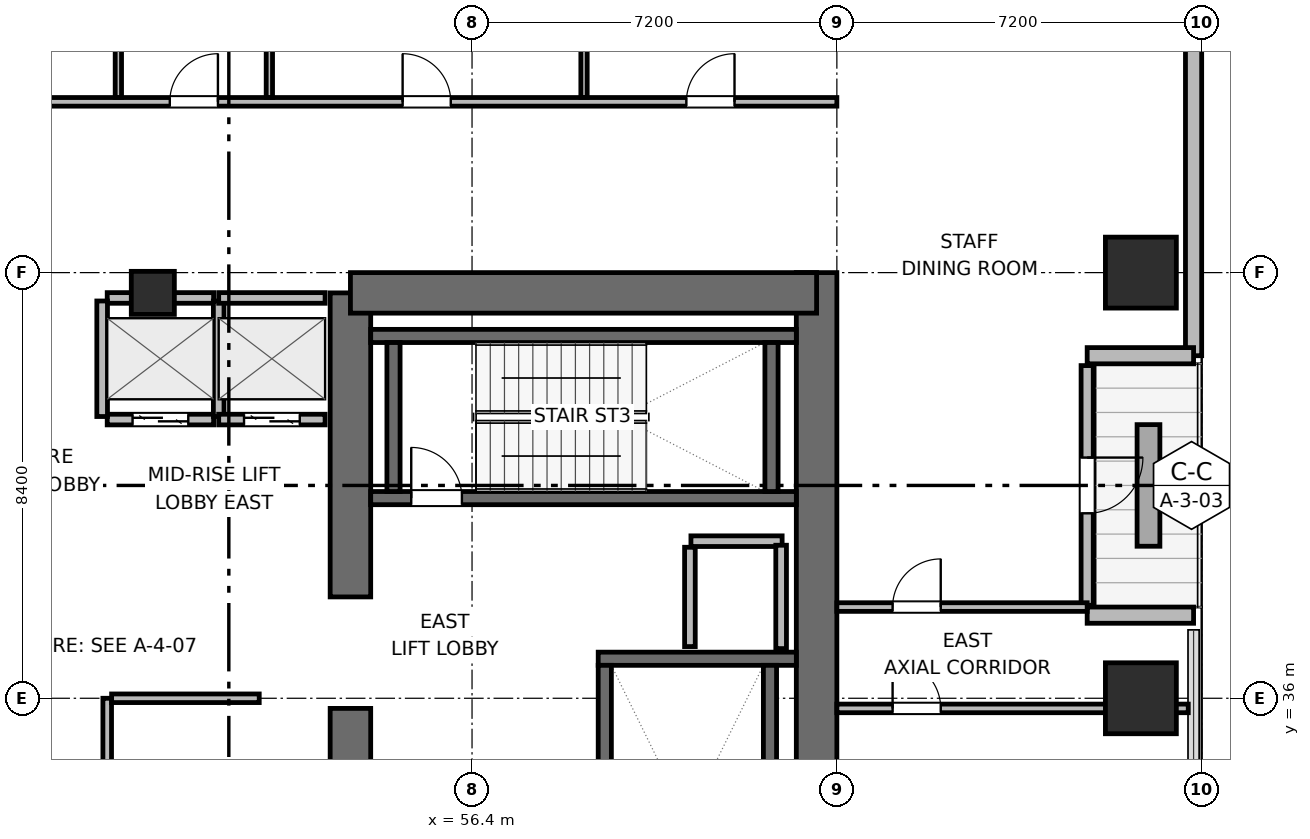
"""IFC4 building model, lengths in metres.
Left out: names, types, materials, properties, quantities, classifications, styles, units other than length and angle.
Written with IfcOpenShell. Run it as: python <this file> out.ifc"""

import sys

from ifc_helpers import new_model, si_unit, direction, frame, frame_2d, origin, origin_2d, place, context, subcontext, project, spatial, rectangle, extrude, element, fill, save


model = new_model("IFC4")
c1 = context("Model", 3, precision=1e-05, world=origin(), true_north=direction((0.0, 1.0)))
c2 = subcontext(c1, "Body", "Model", "MODEL_VIEW")
j1 = project(units=[si_unit("LENGTHUNIT", "METRE"), si_unit("PLANEANGLEUNIT", "RADIAN")], contexts=[c1])
p1 = place(None, origin())
s1 = spatial("IfcSite", under=j1, at=p1, CompositionType="ELEMENT")
p2 = place(p1, origin())
s2 = spatial("IfcBuilding", under=s1, at=p2, CompositionType="ELEMENT")
p3 = place(p2, frame((0.0, 0.0, 120.9)))
s3 = spatial("IfcBuildingStorey", under=s2, at=p3, CompositionType="ELEMENT", Elevation=120.9)
p4 = place(p3, frame((54.0, 28.0, 0.0), z_axis=(0.0, 0.0, 1.0), x_axis=(0.0, 1.0, 0.0)))
e1 = element("IfcWall", 1, at=p4, inside=s3, PredefinedType="SHEAR", context=c2, shape_type="SweptSolid", body=[
    extrude(rectangle(XDim=7.8, YDim=0.8, at=frame_2d((3.9, 0.0))), origin(), (0.0, 0.0, 1.0), 4.5),
])
p5 = place(p3, frame((54.0, 38.0, 0.0), z_axis=(0.0, 0.0, 1.0), x_axis=(0.0, 1.0, 0.0)))
e2 = element("IfcWall", 2, at=p5, inside=s3, PredefinedType="SHEAR", context=c2, shape_type="SweptSolid", body=[
    extrude(rectangle(XDim=6.0, YDim=0.8, at=frame_2d((3.0, 0.0))), origin(), (0.0, 0.0, 1.0), 4.5),
])
p6 = place(p3, frame((63.2, 27.6, 0.0), z_axis=(0.0, 0.0, 1.0), x_axis=(0.0, 1.0, 0.0)))
e3 = element("IfcWall", 3, at=p6, inside=s3, PredefinedType="SHEAR", context=c2, shape_type="SweptSolid", body=[
    extrude(rectangle(XDim=16.8, YDim=0.8, at=frame_2d((8.4, 0.0))), origin(), (0.0, 0.0, 1.0), 4.5),
])
p7 = place(p3, frame((54.0, 44.0, 0.0), z_axis=(0.0, 0.0, 1.0), x_axis=(1.0, 0.0, 0.0)))
e4 = element("IfcWall", 4, at=p7, inside=s3, PredefinedType="SHEAR", context=c2, shape_type="SweptSolid", body=[
    extrude(rectangle(XDim=9.2, YDim=0.8, at=frame_2d((4.6, 0.0))), origin(), (0.0, 0.0, 1.0), 4.5),
])
p8 = place(p3, frame((58.89, 36.78, 0.0), z_axis=(0.0, 0.0, 1.0), x_axis=(1.0, 0.0, 0.0)))
e5 = element("IfcWall", 5, at=p8, inside=s3, PredefinedType="SHEAR", context=c2, shape_type="SweptSolid", body=[
    extrude(rectangle(XDim=3.91, YDim=0.26, at=frame_2d((1.955, 0.0))), origin(), (0.0, 0.0, 1.0), 4.5),
])
p9 = place(p3, frame((59.02, 29.05, 0.0), z_axis=(0.0, 0.0, 1.0), x_axis=(0.0, 1.0, 0.0)))
e6 = element("IfcWall", 6, at=p9, inside=s3, PredefinedType="SHEAR", context=c2, shape_type="SweptSolid", body=[
    extrude(rectangle(XDim=7.6, YDim=0.26, at=frame_2d((3.8, 0.0))), origin(), (0.0, 0.0, 1.0), 4.5),
])
p10 = place(p9, frame((0.3, 0.0, 0.0)))
e7 = element("IfcOpeningElement", 7, at=p10, cuts=e6, PredefinedType="OPENING", context=c2, shape_type="SweptSolid", body=[
    extrude(rectangle(XDim=1.0, YDim=2.04, at=frame_2d((0.5, 1.02))), frame((0.0, 0.14, 0.0), z_axis=(0.0, -1.0, 0.0), x_axis=(1.0, 0.0, 0.0)), (0.0, 0.0, 1.0), 0.28),
])
p11 = place(p3, frame((62.28, 29.05, 0.0), z_axis=(0.0, 0.0, 1.0), x_axis=(0.0, 1.0, 0.0)))
e8 = element("IfcWall", 8, at=p11, inside=s3, PredefinedType="SHEAR", context=c2, shape_type="SweptSolid", body=[
    extrude(rectangle(XDim=7.6, YDim=0.26, at=frame_2d((3.8, 0.0))), origin(), (0.0, 0.0, 1.0), 4.5),
])
p12 = place(p3, frame((54.4, 39.95, 0.0), z_axis=(0.0, 0.0, 1.0), x_axis=(1.0, 0.0, 0.0)))
e9 = element("IfcWall", 9, at=p12, inside=s3, PredefinedType="SHEAR", context=c2, shape_type="SweptSolid", body=[
    extrude(rectangle(XDim=8.4, YDim=0.26, at=frame_2d((4.2, 0.0))), origin(), (0.0, 0.0, 1.0), 4.5),
])
p13 = place(p12, frame((0.8, 0.0, 0.0)))
e10 = element("IfcOpeningElement", 10, at=p13, cuts=e9, PredefinedType="OPENING", context=c2, shape_type="SweptSolid", body=[
    extrude(rectangle(XDim=1.0, YDim=2.04, at=frame_2d((0.5, 1.02))), frame((0.0, 0.14, 0.0), z_axis=(0.0, -1.0, 0.0), x_axis=(1.0, 0.0, 0.0)), (0.0, 0.0, 1.0), 0.28),
])
p14 = place(p3, frame((54.4, 43.15, 0.0), z_axis=(0.0, 0.0, 1.0), x_axis=(1.0, 0.0, 0.0)))
e11 = element("IfcWall", 11, at=p14, inside=s3, PredefinedType="SHEAR", context=c2, shape_type="SweptSolid", body=[
    extrude(rectangle(XDim=8.4, YDim=0.26, at=frame_2d((4.2, 0.0))), origin(), (0.0, 0.0, 1.0), 4.5),
])
for number, where, z_axis, x_axis in (
    (12, (54.85, 40.08, 0.0), (0.0, 0.0, 1.0), (0.0, 1.0, 0.0)),
    (13, (62.31, 40.08, 0.0), (0.0, 0.0, 1.0), (0.0, 1.0, 0.0)),
):
    element("IfcWall", number, at=place(p3, frame(where, z_axis=z_axis, x_axis=x_axis)), inside=s3, PredefinedType="SHEAR", context=c2, shape_type="SweptSolid", body=[
        extrude(rectangle(XDim=2.94, YDim=0.26, at=frame_2d((1.47, 0.0))), origin(), (0.0, 0.0, 1.0), 4.5),
    ])
for number, where, z_axis, x_axis in (
    (14, (69.6, 36.0, 0.0), (0.0, 0.0, 1.0), (1.0, 0.0, 0.0)),
    (15, (69.6, 44.4, 0.0), (0.0, 0.0, 1.0), (1.0, 0.0, 0.0)),
):
    element("IfcColumn", number, at=place(p3, frame(where, z_axis=z_axis, x_axis=x_axis)), inside=s3, PredefinedType="COLUMN", context=c2, shape_type="SweptSolid", body=[
        extrude(rectangle(XDim=1.4, YDim=1.4, at=origin_2d()), origin(), (0.0, 0.0, 1.0), 4.5),
    ])
p15 = place(p3, frame((50.1, 44.0, 0.0), z_axis=(0.0, 0.0, 1.0), x_axis=(1.0, 0.0, 0.0)))
e16 = element("IfcColumn", 16, at=p15, inside=s3, PredefinedType="COLUMN", context=c2, shape_type="SweptSolid", body=[
    extrude(rectangle(XDim=0.85, YDim=0.85, at=origin_2d()), origin(), (0.0, 0.0, 1.0), 4.5),
])
p16 = place(p3, frame((70.64, 56.979, 0.0), z_axis=(0.0, 0.0, 1.0), x_axis=(0.0, -1.0, 0.0)))
e17 = element("IfcWall", 17, at=p16, inside=s3, PredefinedType="SOLIDWALL", context=c2, shape_type="SweptSolid", body=[
    extrude(rectangle(XDim=14.219, YDim=0.32, at=frame_2d((7.109, 0.0))), origin(), (0.0, 0.0, 1.0), 4.24),
])
p17 = place(p3, frame((70.64, 42.76, 0.0), z_axis=(0.0, 0.0, 1.0), x_axis=(-1.0, 0.0, 0.0)))
e18 = element("IfcWall", 18, at=p17, inside=s3, PredefinedType="SOLIDWALL", context=c2, shape_type="SweptSolid", body=[
    extrude(rectangle(XDim=2.1, YDim=0.32, at=frame_2d((1.05, 0.0))), origin(), (0.0, 0.0, 1.0), 3.475),
])
p18 = place(p3, frame((68.54, 42.565, 0.0), z_axis=(0.0, 0.0, 1.0), x_axis=(0.0, -1.0, 0.0)))
e19 = element("IfcWall", 19, at=p18, inside=s3, PredefinedType="SOLIDWALL", context=c2, shape_type="SweptSolid", body=[
    extrude(rectangle(XDim=4.73, YDim=0.24, at=frame_2d((2.365, 0.0))), origin(), (0.0, 0.0, 1.0), 3.762),
])
p19 = place(p18, frame((1.815, 0.0, 0.0)))
e20 = element("IfcOpeningElement", 20, at=p19, cuts=e19, PredefinedType="OPENING", context=c2, shape_type="SweptSolid", body=[
    extrude(rectangle(XDim=1.1, YDim=2.04, at=frame_2d((0.55, 1.02))), frame((0.0, 0.13, 0.0), z_axis=(0.0, -1.0, 0.0), x_axis=(1.0, 0.0, 0.0)), (0.0, 0.0, 1.0), 0.26),
])
p20 = place(p3, frame((68.54, 37.64, 0.0), z_axis=(0.0, 0.0, 1.0), x_axis=(1.0, 0.0, 0.0)))
e21 = element("IfcWall", 21, at=p20, inside=s3, PredefinedType="SOLIDWALL", context=c2, shape_type="SweptSolid", body=[
    extrude(rectangle(XDim=2.1, YDim=0.32, at=frame_2d((1.05, 0.0))), origin(), (0.0, 0.0, 1.0), 3.475),
])
p21 = place(p3, frame((60.72, 39.1, 0.0), z_axis=(0.0, 0.0, 1.0), x_axis=(1.0, 0.0, 0.0)))
e22 = element("IfcWall", 22, at=p21, inside=s3, PredefinedType="PARTITIONING", context=c2, shape_type="SweptSolid", body=[
    extrude(rectangle(XDim=1.8, YDim=0.21, at=frame_2d((0.9, 0.0))), origin(), (0.0, 0.0, 1.0), 4.24),
])
p22 = place(p3, frame((60.7, 37.02, 0.0), z_axis=(0.0, 0.0, 1.0), x_axis=(0.0, 1.0, 0.0)))
e23 = element("IfcWall", 23, at=p22, inside=s3, PredefinedType="PARTITIONING", context=c2, shape_type="SweptSolid", body=[
    extrude(rectangle(XDim=1.96, YDim=0.21, at=frame_2d((0.98, 0.0))), origin(), (0.0, 0.0, 1.0), 4.24),
])
p23 = place(p3, frame((62.5, 36.98, 0.0), z_axis=(0.0, 0.0, 1.0), x_axis=(0.0, 1.0, 0.0)))
e24 = element("IfcWall", 24, at=p23, inside=s3, PredefinedType="PARTITIONING", context=c2, shape_type="SweptSolid", body=[
    extrude(rectangle(XDim=2.04, YDim=0.21, at=frame_2d((1.02, 0.0))), origin(), (0.0, 0.0, 1.0), 4.24),
])
p24 = place(p3, frame((49.2, 41.5, 0.0), z_axis=(0.0, 0.0, 1.0), x_axis=(1.0, 0.0, 0.0)))
e25 = element("IfcWall", 25, at=p24, inside=s3, PredefinedType="PARTITIONING", context=c2, shape_type="SweptSolid", body=[
    extrude(rectangle(XDim=2.1, YDim=0.21, at=frame_2d((1.05, 0.0))), origin(), (0.0, 0.0, 1.0), 4.24),
])
p25 = place(p24, frame((0.5, 0.0, 0.0)))
e26 = element("IfcOpeningElement", 26, at=p25, cuts=e25, PredefinedType="OPENING", context=c2, shape_type="SweptSolid", body=[
    extrude(rectangle(XDim=1.1, YDim=2.04, at=frame_2d((0.55, 1.02))), frame((0.0, 0.115, 0.0), z_axis=(0.0, -1.0, 0.0), x_axis=(1.0, 0.0, 0.0)), (0.0, 0.0, 1.0), 0.23),
])
p26 = place(p3, frame((49.2, 43.9, 0.0), z_axis=(0.0, 0.0, 1.0), x_axis=(1.0, 0.0, 0.0)))
e27 = element("IfcWall", 27, at=p26, inside=s3, PredefinedType="PARTITIONING", context=c2, shape_type="SweptSolid", body=[
    extrude(rectangle(XDim=2.1, YDim=0.21, at=frame_2d((1.05, 0.0))), origin(), (0.0, 0.0, 1.0), 3.125),
])
for number, where, z_axis, x_axis in (
    (28, (49.1, 41.56, 0.0), (0.0, 0.0, 1.0), (0.0, 1.0, 0.0)),
    (29, (51.4, 41.56, 0.0), (0.0, 0.0, 1.0), (0.0, 1.0, 0.0)),
):
    element("IfcWall", number, at=place(p3, frame(where, z_axis=z_axis, x_axis=x_axis)), inside=s3, PredefinedType="PARTITIONING", context=c2, shape_type="SweptSolid", body=[
        extrude(rectangle(XDim=2.28, YDim=0.21, at=frame_2d((1.14, 0.0))), origin(), (0.0, 0.0, 1.0), 4.24),
    ])
p27 = place(p3, frame((51.4, 41.5, 0.0), z_axis=(0.0, 0.0, 1.0), x_axis=(1.0, 0.0, 0.0)))
e30 = element("IfcWall", 30, at=p27, inside=s3, PredefinedType="PARTITIONING", context=c2, shape_type="SweptSolid", body=[
    extrude(rectangle(XDim=2.1, YDim=0.21, at=frame_2d((1.05, 0.0))), origin(), (0.0, 0.0, 1.0), 4.24),
])
p28 = place(p27, frame((0.5, 0.0, 0.0)))
e31 = element("IfcOpeningElement", 31, at=p28, cuts=e30, PredefinedType="OPENING", context=c2, shape_type="SweptSolid", body=[
    extrude(rectangle(XDim=1.1, YDim=2.04, at=frame_2d((0.55, 1.02))), frame((0.0, 0.115, 0.0), z_axis=(0.0, -1.0, 0.0), x_axis=(1.0, 0.0, 0.0)), (0.0, 0.0, 1.0), 0.23),
])
p29 = place(p3, frame((51.4, 43.9, 0.0), z_axis=(0.0, 0.0, 1.0), x_axis=(1.0, 0.0, 0.0)))
e32 = element("IfcWall", 32, at=p29, inside=s3, PredefinedType="PARTITIONING", context=c2, shape_type="SweptSolid", body=[
    extrude(rectangle(XDim=2.1, YDim=0.21, at=frame_2d((1.05, 0.0))), origin(), (0.0, 0.0, 1.0), 3.125),
])
p30 = place(p3, frame((49.2, 32.6, 0.0), z_axis=(0.0, 0.0, 1.0), x_axis=(0.0, 1.0, 0.0)))
e33 = element("IfcWall", 33, at=p30, inside=s3, PredefinedType="PARTITIONING", context=c2, shape_type="SweptSolid", body=[
    extrude(rectangle(XDim=3.4, YDim=0.17, at=frame_2d((1.7, 0.0))), origin(), (0.0, 0.0, 1.0), 4.24),
])
p31 = place(p30, frame((1.25, 0.0, 0.0)))
e34 = element("IfcOpeningElement", 34, at=p31, cuts=e33, PredefinedType="OPENING", context=c2, shape_type="SweptSolid", body=[
    extrude(rectangle(XDim=0.9, YDim=2.02, at=frame_2d((0.45, 1.01))), frame((0.0, 0.095, 0.0), z_axis=(0.0, -1.0, 0.0), x_axis=(1.0, 0.0, 0.0)), (0.0, 0.0, 1.0), 0.19),
])
p32 = place(p3, frame((49.287, 36.0, 0.0), z_axis=(0.0, 0.0, 1.0), x_axis=(1.0, 0.0, 0.0)))
e35 = element("IfcWall", 35, at=p32, inside=s3, PredefinedType="PARTITIONING", context=c2, shape_type="SweptSolid", body=[
    extrude(rectangle(XDim=2.913, YDim=0.17, at=frame_2d((1.457, 0.0))), origin(), (0.0, 0.0, 1.0), 4.24),
])
p33 = place(p3, frame((29.25, 47.77, 0.0), z_axis=(0.0, 0.0, 1.0), x_axis=(1.0, 0.0, 0.0)))
e36 = element("IfcWall", 36, at=p33, inside=s3, PredefinedType="PARTITIONING", context=c2, shape_type="SweptSolid", body=[
    extrude(rectangle(XDim=34.35, YDim=0.17, at=frame_2d((17.175, 0.0))), origin(), (0.0, 0.0, 1.0), 4.24),
])
p34 = place(p33, frame((1.225, 0.0, 0.0)))
e37 = element("IfcOpeningElement", 37, at=p34, cuts=e36, PredefinedType="OPENING", context=c2, shape_type="SweptSolid", body=[
    extrude(rectangle(XDim=0.95, YDim=2.04, at=frame_2d((0.475, 1.02))), frame((0.0, 0.095, 0.0), z_axis=(0.0, -1.0, 0.0), x_axis=(1.0, 0.0, 0.0)), (0.0, 0.0, 1.0), 0.19),
])
p35 = place(p33, frame((6.415, 0.0, 0.0)))
e38 = element("IfcOpeningElement", 38, at=p35, cuts=e36, PredefinedType="OPENING", context=c2, shape_type="SweptSolid", body=[
    extrude(rectangle(XDim=0.95, YDim=2.04, at=frame_2d((0.475, 1.02))), frame((0.0, 0.095, 0.0), z_axis=(0.0, -1.0, 0.0), x_axis=(1.0, 0.0, 0.0)), (0.0, 0.0, 1.0), 0.19),
])
p36 = place(p33, frame((12.105, 0.0, 0.0)))
e39 = element("IfcOpeningElement", 39, at=p36, cuts=e36, PredefinedType="OPENING", context=c2, shape_type="SweptSolid", body=[
    extrude(rectangle(XDim=0.95, YDim=2.04, at=frame_2d((0.475, 1.02))), frame((0.0, 0.095, 0.0), z_axis=(0.0, -1.0, 0.0), x_axis=(1.0, 0.0, 0.0)), (0.0, 0.0, 1.0), 0.19),
])
p37 = place(p33, frame((17.0, 0.0, 0.0)))
e40 = element("IfcOpeningElement", 40, at=p37, cuts=e36, PredefinedType="OPENING", context=c2, shape_type="SweptSolid", body=[
    extrude(rectangle(XDim=0.95, YDim=2.04, at=frame_2d((0.475, 1.02))), frame((0.0, 0.095, 0.0), z_axis=(0.0, -1.0, 0.0), x_axis=(1.0, 0.0, 0.0)), (0.0, 0.0, 1.0), 0.19),
])
p38 = place(p33, frame((21.185, 0.0, 0.0)))
e41 = element("IfcOpeningElement", 41, at=p38, cuts=e36, PredefinedType="OPENING", context=c2, shape_type="SweptSolid", body=[
    extrude(rectangle(XDim=0.95, YDim=2.04, at=frame_2d((0.475, 1.02))), frame((0.0, 0.095, 0.0), z_axis=(0.0, -1.0, 0.0), x_axis=(1.0, 0.0, 0.0)), (0.0, 0.0, 1.0), 0.19),
])
p39 = place(p33, frame((25.78, 0.0, 0.0)))
e42 = element("IfcOpeningElement", 42, at=p39, cuts=e36, PredefinedType="OPENING", context=c2, shape_type="SweptSolid", body=[
    extrude(rectangle(XDim=0.95, YDim=2.04, at=frame_2d((0.475, 1.02))), frame((0.0, 0.095, 0.0), z_axis=(0.0, -1.0, 0.0), x_axis=(1.0, 0.0, 0.0)), (0.0, 0.0, 1.0), 0.19),
])
p40 = place(p33, frame((31.38, 0.0, 0.0)))
e43 = element("IfcOpeningElement", 43, at=p40, cuts=e36, PredefinedType="OPENING", context=c2, shape_type="SweptSolid", body=[
    extrude(rectangle(XDim=0.95, YDim=2.04, at=frame_2d((0.475, 1.02))), frame((0.0, 0.095, 0.0), z_axis=(0.0, -1.0, 0.0), x_axis=(1.0, 0.0, 0.0)), (0.0, 0.0, 1.0), 0.19),
])
p41 = place(p3, frame((49.42, 47.857, 0.0), z_axis=(0.0, 0.0, 1.0), x_axis=(0.0, 1.0, 0.0)))
e44 = element("IfcWall", 44, at=p41, inside=s3, PredefinedType="PARTITIONING", context=c2, shape_type="SweptSolid", body=[
    extrude(rectangle(XDim=10.568, YDim=0.125, at=frame_2d((5.284, 0.0))), origin(), (0.0, 0.0, 1.0), 4.24),
])
p42 = place(p3, frame((52.4, 47.857, 0.0), z_axis=(0.0, 0.0, 1.0), x_axis=(0.0, 1.0, 0.0)))
e45 = element("IfcWall", 45, at=p42, inside=s3, PredefinedType="PARTITIONING", context=c2, shape_type="SweptSolid", body=[
    extrude(rectangle(XDim=10.568, YDim=0.125, at=frame_2d((5.284, 0.0))), origin(), (0.0, 0.0, 1.0), 3.603),
])
p43 = place(p3, frame((58.61, 47.857, 0.0), z_axis=(0.0, 0.0, 1.0), x_axis=(0.0, 1.0, 0.0)))
e46 = element("IfcWall", 46, at=p43, inside=s3, PredefinedType="PARTITIONING", context=c2, shape_type="SweptSolid", body=[
    extrude(rectangle(XDim=14.228, YDim=0.125, at=frame_2d((7.114, 0.0))), origin(), (0.0, 0.0, 1.0), 4.24),
])
p44 = place(p3, frame((63.6, 35.8, 0.0), z_axis=(0.0, 0.0, 1.0), x_axis=(1.0, 0.0, 0.0)))
e47 = element("IfcWall", 47, at=p44, inside=s3, PredefinedType="PARTITIONING", context=c2, shape_type="SweptSolid", body=[
    extrude(rectangle(XDim=6.935, YDim=0.17, at=frame_2d((3.467, 0.0))), origin(), (0.0, 0.0, 1.0), 3.603),
])
p45 = place(p44, frame((1.1, 0.0, 0.0)))
e48 = element("IfcOpeningElement", 48, at=p45, cuts=e47, PredefinedType="OPENING", context=c2, shape_type="SweptSolid", body=[
    extrude(rectangle(XDim=0.95, YDim=2.04, at=frame_2d((0.475, 1.02))), frame((0.0, 0.095, 0.0), z_axis=(0.0, -1.0, 0.0), x_axis=(1.0, 0.0, 0.0)), (0.0, 0.0, 1.0), 0.19),
])
p46 = place(p3, frame((63.6, 37.8, 0.0), z_axis=(0.0, 0.0, 1.0), x_axis=(1.0, 0.0, 0.0)))
e49 = element("IfcWall", 49, at=p46, inside=s3, PredefinedType="PARTITIONING", context=c2, shape_type="SweptSolid", body=[
    extrude(rectangle(XDim=4.94, YDim=0.17, at=frame_2d((2.47, 0.0))), origin(), (0.0, 0.0, 1.0), 4.24),
])
p47 = place(p46, frame((1.1, 0.0, 0.0)))
e50 = element("IfcOpeningElement", 50, at=p47, cuts=e49, PredefinedType="OPENING", context=c2, shape_type="SweptSolid", body=[
    extrude(rectangle(XDim=0.95, YDim=2.04, at=frame_2d((0.475, 1.02))), frame((0.0, 0.095, 0.0), z_axis=(0.0, -1.0, 0.0), x_axis=(1.0, 0.0, 0.0)), (0.0, 0.0, 1.0), 0.19),
])
p48 = place(p19, origin())
e51 = element("IfcDoor", 51, at=p48, inside=s3, OperationType="SINGLE_SWING_LEFT", PredefinedType="DOOR", context=c2, shape_type="SweptSolid", body=[
    extrude(rectangle(XDim=1.1, YDim=2.04, at=frame_2d((0.55, 1.02))), frame((0.0, 0.025, 0.0), z_axis=(0.0, -1.0, 0.0), x_axis=(1.0, 0.0, 0.0)), (0.0, 0.0, 1.0), 0.05),
])
fill(e20, e51)
p49 = place(p13, origin())
e52 = element("IfcDoor", 52, at=p49, inside=s3, OperationType="SINGLE_SWING_LEFT", PredefinedType="DOOR", context=c2, shape_type="SweptSolid", body=[
    extrude(rectangle(XDim=1.0, YDim=2.04, at=frame_2d((0.5, 1.02))), frame((0.0, 0.025, 0.0), z_axis=(0.0, -1.0, 0.0), x_axis=(1.0, 0.0, 0.0)), (0.0, 0.0, 1.0), 0.05),
])
fill(e10, e52)
p50 = place(p25, origin())
e53 = element("IfcDoor", 53, at=p50, inside=s3, OperationType="DOUBLE_DOOR_SLIDING", PredefinedType="DOOR", context=c2, shape_type="SweptSolid", body=[
    extrude(rectangle(XDim=1.1, YDim=2.04, at=frame_2d((0.55, 1.02))), frame((0.0, 0.025, 0.0), z_axis=(0.0, -1.0, 0.0), x_axis=(1.0, 0.0, 0.0)), (0.0, 0.0, 1.0), 0.05),
])
fill(e26, e53)
p51 = place(p28, origin())
e54 = element("IfcDoor", 54, at=p51, inside=s3, OperationType="DOUBLE_DOOR_SLIDING", PredefinedType="DOOR", context=c2, shape_type="SweptSolid", body=[
    extrude(rectangle(XDim=1.1, YDim=2.04, at=frame_2d((0.55, 1.02))), frame((0.0, 0.025, 0.0), z_axis=(0.0, -1.0, 0.0), x_axis=(1.0, 0.0, 0.0)), (0.0, 0.0, 1.0), 0.05),
])
fill(e31, e54)
p52 = place(p38, origin())
e55 = element("IfcDoor", 55, at=p52, inside=s3, OperationType="SINGLE_SWING_RIGHT", PredefinedType="DOOR", context=c2, shape_type="SweptSolid", body=[
    extrude(rectangle(XDim=0.95, YDim=2.04, at=frame_2d((0.475, 1.02))), frame((0.0, 0.025, 0.0), z_axis=(0.0, -1.0, 0.0), x_axis=(1.0, 0.0, 0.0)), (0.0, 0.0, 1.0), 0.05),
])
fill(e41, e55)
p53 = place(p39, origin())
e56 = element("IfcDoor", 56, at=p53, inside=s3, OperationType="SINGLE_SWING_LEFT", PredefinedType="DOOR", context=c2, shape_type="SweptSolid", body=[
    extrude(rectangle(XDim=0.95, YDim=2.04, at=frame_2d((0.475, 1.02))), frame((0.0, 0.025, 0.0), z_axis=(0.0, -1.0, 0.0), x_axis=(1.0, 0.0, 0.0)), (0.0, 0.0, 1.0), 0.05),
])
fill(e42, e56)
p54 = place(p40, origin())
e57 = element("IfcDoor", 57, at=p54, inside=s3, OperationType="SINGLE_SWING_RIGHT", PredefinedType="DOOR", context=c2, shape_type="SweptSolid", body=[
    extrude(rectangle(XDim=0.95, YDim=2.04, at=frame_2d((0.475, 1.02))), frame((0.0, 0.025, 0.0), z_axis=(0.0, -1.0, 0.0), x_axis=(1.0, 0.0, 0.0)), (0.0, 0.0, 1.0), 0.05),
])
fill(e43, e57)
p55 = place(p45, origin())
e58 = element("IfcDoor", 58, at=p55, inside=s3, OperationType="SINGLE_SWING_LEFT", PredefinedType="DOOR", context=c2, shape_type="SweptSolid", body=[
    extrude(rectangle(XDim=0.95, YDim=2.04, at=frame_2d((0.475, 1.02))), frame((0.0, 0.025, 0.0), z_axis=(0.0, -1.0, 0.0), x_axis=(1.0, 0.0, 0.0)), (0.0, 0.0, 1.0), 0.05),
])
fill(e48, e58)
p56 = place(p47, origin())
e59 = element("IfcDoor", 59, at=p56, inside=s3, OperationType="SINGLE_SWING_RIGHT", PredefinedType="DOOR", context=c2, shape_type="SweptSolid", body=[
    extrude(rectangle(XDim=0.95, YDim=2.04, at=frame_2d((0.475, 1.02))), frame((0.0, 0.025, 0.0), z_axis=(0.0, -1.0, 0.0), x_axis=(1.0, 0.0, 0.0)), (0.0, 0.0, 1.0), 0.05),
])
fill(e50, e59)
save(model, sys.argv[1])
